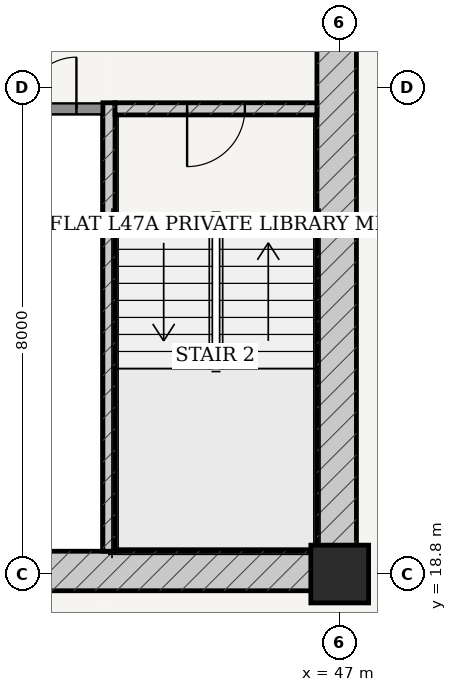
"""IFC4 building model, lengths in metres.
Left out: names, types, materials, properties, quantities, classifications, styles, units other than length and angle.
Written with IfcOpenShell. Run it as: python <this file> out.ifc"""

import sys

from ifc_helpers import new_model, si_unit, direction, frame, frame_2d, origin, origin_2d, place, context, subcontext, project, spatial, rectangle, extrude, source, transform, mapped, element, fill, save


model = new_model("IFC4")
c1 = context("Model", 3, precision=1e-05, world=origin(), true_north=direction((-0.2419218956, 0.970295726276)))
c2 = subcontext(c1, "Body", "Model", "MODEL_VIEW")
j1 = project(units=[si_unit("LENGTHUNIT", "METRE"), si_unit("PLANEANGLEUNIT", "RADIAN")], contexts=[c1])
p1 = place(None, origin())
s1 = spatial("IfcSite", under=j1, at=p1, CompositionType="ELEMENT")
p2 = place(p1, origin())
s2 = spatial("IfcBuilding", under=s1, at=p2, CompositionType="ELEMENT")
p3 = place(p2, frame((0.0, 0.0, 178.6)))
s3 = spatial("IfcBuildingStorey", under=s2, at=p3, CompositionType="ELEMENT", Elevation=178.6)
p4 = place(p3, frame((47.0, 18.8, 0.0), z_axis=(0.0, 0.0, 1.0), x_axis=(1.0, 0.0, 0.0)))
e1 = element("IfcColumn", 1, at=p4, inside=s3, PredefinedType="COLUMN", context=c2, shape_type="SweptSolid", body=[
    extrude(rectangle(XDim=0.95, YDim=0.95, at=origin_2d()), origin(), (0.0, 0.0, 1.0), 3.6),
])
p5 = place(p3, frame((28.725, 18.85, 0.0), z_axis=(0.0, 0.0, 1.0), x_axis=(1.0, 0.0, 0.0)))
e2 = element("IfcWall", 2, at=p5, inside=s3, PredefinedType="SHEAR", context=c2, shape_type="SweptSolid", body=[
    extrude(rectangle(XDim=18.55, YDim=0.65, at=frame_2d((9.275, 0.0))), origin(), (0.0, 0.0, 1.0), 3.33),
])
p6 = place(p5, frame((7.51, 0.0, 0.0)))
e3 = element("IfcOpeningElement", 3, at=p6, cuts=e2, PredefinedType="OPENING", context=c2, shape_type="SweptSolid", body=[
    extrude(rectangle(XDim=0.85, YDim=2.1, at=frame_2d((0.425, 1.05))), frame((0.0, 0.335, 0.0), z_axis=(0.0, -1.0, 0.0), x_axis=(1.0, 0.0, 0.0)), (0.0, 0.0, 1.0), 0.67),
])
p7 = place(p5, frame((10.59, 0.0, 0.0)))
e4 = element("IfcOpeningElement", 4, at=p7, cuts=e2, PredefinedType="OPENING", context=c2, shape_type="SweptSolid", body=[
    extrude(rectangle(XDim=0.85, YDim=2.1, at=frame_2d((0.425, 1.05))), frame((0.0, 0.335, 0.0), z_axis=(0.0, -1.0, 0.0), x_axis=(1.0, 0.0, 0.0)), (0.0, 0.0, 1.0), 0.67),
])
p8 = place(p3, frame((46.95, 19.175, 0.0), z_axis=(0.0, 0.0, 1.0), x_axis=(0.0, 1.0, 0.0)))
e5 = element("IfcWall", 5, at=p8, inside=s3, PredefinedType="SHEAR", context=c2, shape_type="SweptSolid", body=[
    extrude(rectangle(XDim=15.25, YDim=0.65, at=frame_2d((7.625, 0.0))), origin(), (0.0, 0.0, 1.0), 3.33),
])
p9 = place(p8, frame((9.875, 0.0, 0.0)))
e6 = element("IfcOpeningElement", 6, at=p9, cuts=e5, PredefinedType="OPENING", context=c2, shape_type="SweptSolid", body=[
    extrude(rectangle(XDim=1.5, YDim=2.2, at=frame_2d((0.75, 1.1))), frame((0.0, 0.335, 0.0), z_axis=(0.0, -1.0, 0.0), x_axis=(1.0, 0.0, 0.0)), (0.0, 0.0, 1.0), 0.67),
])
p10 = place(p3, frame((43.205, 19.175, 0.0), z_axis=(0.0, 0.0, 1.0), x_axis=(0.0, 1.0, 0.0)))
e7 = element("IfcWall", 7, at=p10, inside=s3, PredefinedType="SOLIDWALL", context=c2, shape_type="SweptSolid", body=[
    extrude(rectangle(XDim=7.375, YDim=0.2, at=frame_2d((3.688, 0.0))), origin(), (0.0, 0.0, 1.0), 3.33),
])
p11 = place(p3, frame((43.305, 26.45, 0.0), z_axis=(0.0, 0.0, 1.0), x_axis=(1.0, 0.0, 0.0)))
e8 = element("IfcWall", 8, at=p11, inside=s3, PredefinedType="SOLIDWALL", context=c2, shape_type="SweptSolid", body=[
    extrude(rectangle(XDim=3.32, YDim=0.2, at=frame_2d((1.66, 0.0))), origin(), (0.0, 0.0, 1.0), 3.33),
])
p12 = place(p11, frame((1.185, 0.0, 0.0)))
e9 = element("IfcOpeningElement", 9, at=p12, cuts=e8, PredefinedType="OPENING", context=c2, shape_type="SweptSolid", body=[
    extrude(rectangle(XDim=0.95, YDim=2.15, at=frame_2d((0.475, 1.075))), frame((0.0, 0.11, 0.0), z_axis=(0.0, -1.0, 0.0), x_axis=(1.0, 0.0, 0.0)), (0.0, 0.0, 1.0), 0.22),
])
p13 = place(p3, frame((41.39, 26.45, 0.0), z_axis=(0.0, 0.0, 1.0), x_axis=(1.0, 0.0, 0.0)))
e10 = element("IfcWall", 10, at=p13, inside=s3, PredefinedType="PARTITIONING", context=c2, shape_type="SweptSolid", body=[
    extrude(rectangle(XDim=1.71, YDim=0.18, at=frame_2d((0.855, 0.0))), origin(), (0.0, 0.0, 1.0), 3.33),
])
p14 = place(p13, frame((0.43, 0.0, 0.0)))
e11 = element("IfcOpeningElement", 11, at=p14, cuts=e10, PredefinedType="OPENING", context=c2, shape_type="SweptSolid", body=[
    extrude(rectangle(XDim=0.85, YDim=2.1, at=frame_2d((0.425, 1.05))), frame((0.0, 0.1, 0.0), z_axis=(0.0, -1.0, 0.0), x_axis=(1.0, 0.0, 0.0)), (0.0, 0.0, 1.0), 0.2),
])
m1 = source(origin(), c2, "Body", "SweptSolid", [
    extrude(rectangle(XDim=0.95, YDim=2.15, at=frame_2d((0.475, 1.075))), frame((0.0, 0.025, 0.0), z_axis=(0.0, -1.0, 0.0), x_axis=(1.0, 0.0, 0.0)), (0.0, 0.0, 1.0), 0.05),
])
p15 = place(p12, frame((0.95, 0.0, 0.0), z_axis=(0.0, 0.0, 1.0), x_axis=(-1.0, 0.0, 0.0)))
e12 = element("IfcDoor", 12, at=p15, inside=s3, OperationType="SINGLE_SWING_RIGHT", PredefinedType="DOOR", context=c2, shape_type="MappedRepresentation", body=[
    mapped(m1, transform((0.0, 0.0, 0.0), scale=1.0)),
])
fill(e9, e12)
m2 = source(origin(), c2, "Body", "SweptSolid", [
    extrude(rectangle(XDim=0.85, YDim=2.1, at=frame_2d((0.425, 1.05))), frame((0.0, 0.025, 0.0), z_axis=(0.0, -1.0, 0.0), x_axis=(1.0, 0.0, 0.0)), (0.0, 0.0, 1.0), 0.05),
])
p16 = place(p14, origin())
e13 = element("IfcDoor", 13, at=p16, inside=s3, OperationType="SINGLE_SWING_RIGHT", PredefinedType="DOOR", context=c2, shape_type="MappedRepresentation", body=[
    mapped(m2, transform((0.0, 0.0, 0.0), scale=1.0)),
])
fill(e11, e13)
save(model, sys.argv[1])
